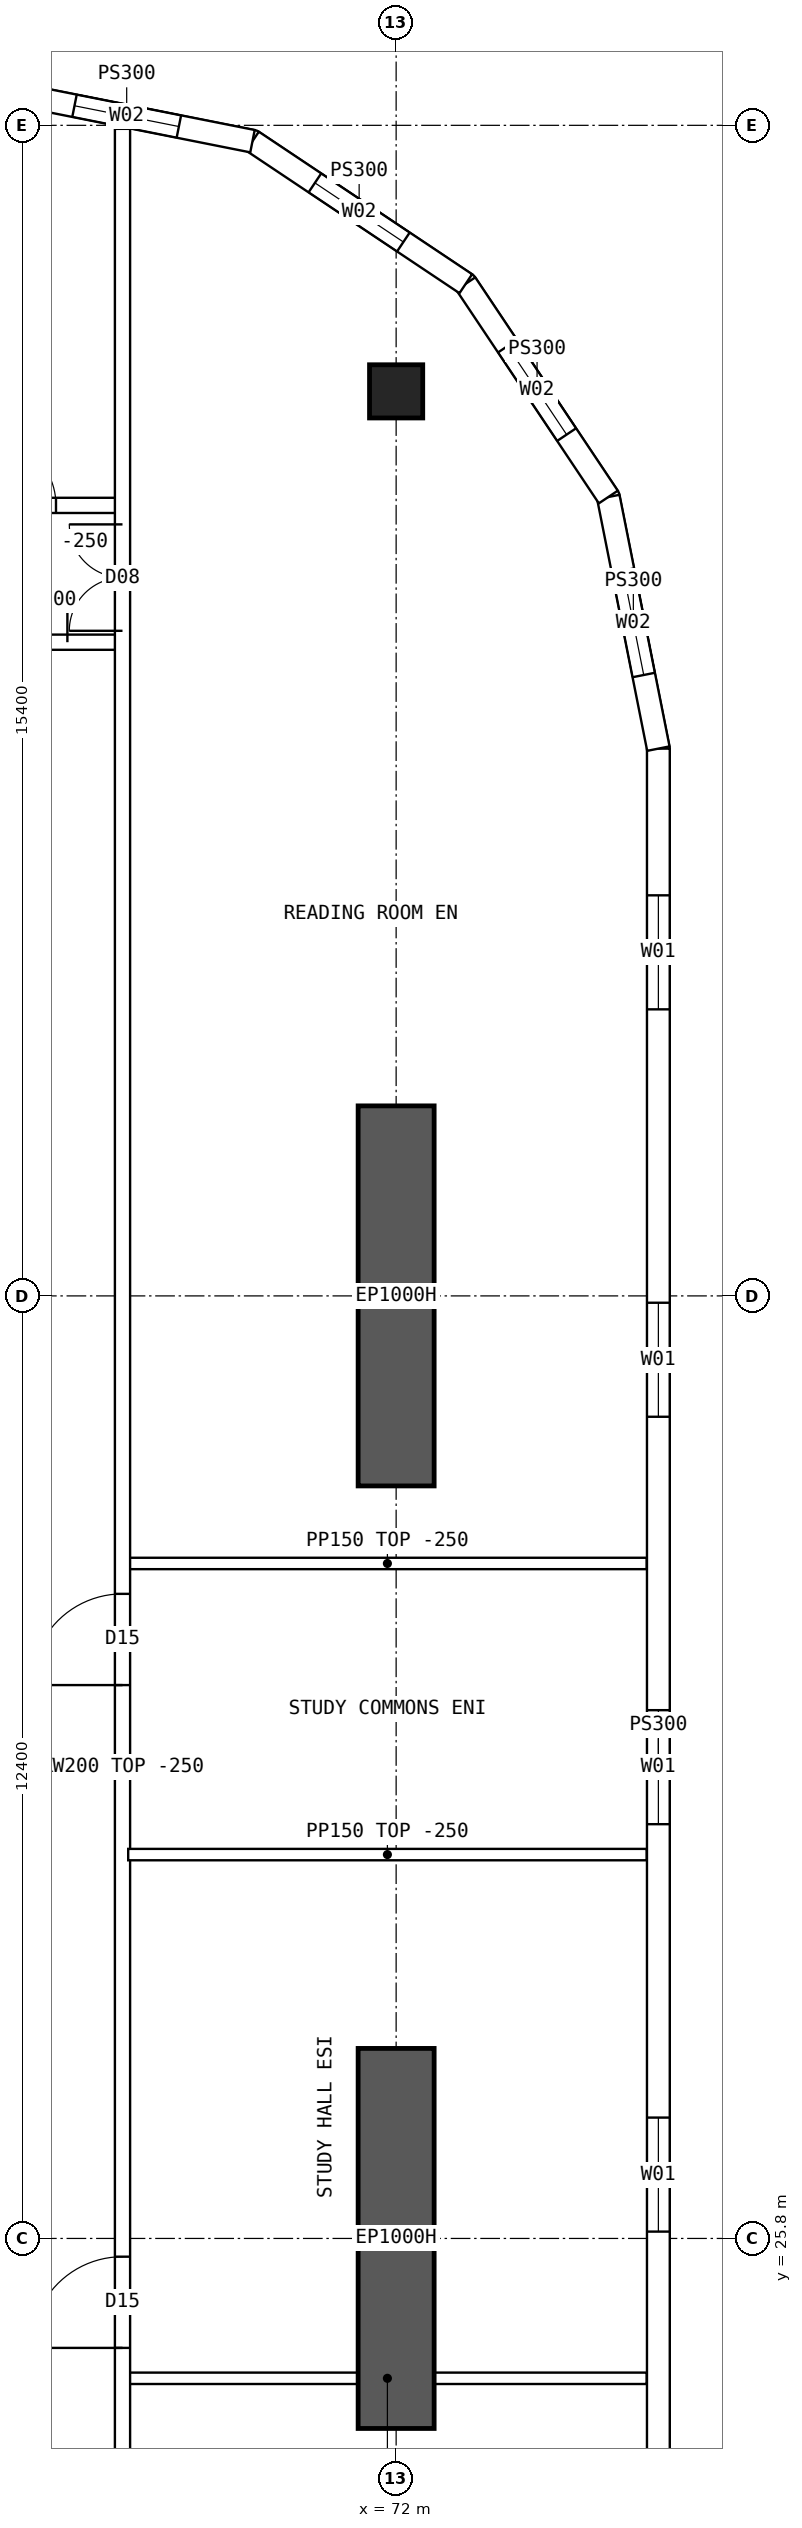
"""IFC4 building model, lengths in metres.
Left out: names, types, materials, properties, quantities, classifications, styles, units other than length and angle.
Written with IfcOpenShell. Run it as: python <this file> out.ifc"""

import sys

from ifc_helpers import new_model, si_unit, direction, frame, frame_2d, origin, origin_2d, place, context, subcontext, project, spatial, polyline, rectangle, hollow_rectangle, outline, extrude, element, fill, save


model = new_model("IFC4")
c1 = context("Model", 3, precision=1e-05, world=origin(), true_north=direction((0.0, 1.0)))
c2 = subcontext(c1, "Body", "Model", "MODEL_VIEW")
j1 = project(units=[si_unit("LENGTHUNIT", "METRE"), si_unit("PLANEANGLEUNIT", "RADIAN")], contexts=[c1])
p1 = place(None, origin())
s1 = spatial("IfcSite", under=j1, at=p1, CompositionType="ELEMENT")
p2 = place(p1, origin())
s2 = spatial("IfcBuilding", under=s1, at=p2, CompositionType="ELEMENT")
p3 = place(p2, frame((0.0, 0.0, 171.1)))
s3 = spatial("IfcBuildingStorey", under=s2, at=p3, CompositionType="ELEMENT", Elevation=171.1)
p4 = place(p3, frame((72.0, 50.1, 0.0), z_axis=(0.0, 0.0, 1.0), x_axis=(1.0, 0.0, 0.0)))
e1 = element("IfcColumn", 1, at=p4, inside=s3, PredefinedType="COLUMN", context=c2, shape_type="SweptSolid", body=[
    extrude(hollow_rectangle(XDim=0.7, YDim=0.7, WallThickness=0.07, at=origin_2d()), origin(), (0.0, 0.0, 1.0), 3.75),
])
for number, where, z_axis, x_axis in (
    (2, (72.0, 23.3, 0.0), (0.0, 0.0, 1.0), (0.0, 1.0, 0.0)),
    (3, (72.0, 35.7, 0.0), (0.0, 0.0, 1.0), (0.0, 1.0, 0.0)),
):
    element("IfcWall", number, at=place(p3, frame(where, z_axis=z_axis, x_axis=x_axis)), inside=s3, PredefinedType="SHEAR", context=c2, shape_type="SweptSolid", body=[
        extrude(rectangle(XDim=5.0, YDim=1.0, at=frame_2d((2.5, 0.0))), origin(), (0.0, 0.0, 1.0), 3.75),
    ])
p5 = place(p3, frame((75.45, 18.6, 0.0), z_axis=(0.0, 0.0, 1.0), x_axis=(0.0, 1.0, 0.0)))
e4 = element("IfcWall", 4, at=p5, inside=s3, PredefinedType="SOLIDWALL", context=c2, shape_type="SweptSolid", body=[
    extrude(outline(polyline([(-0.015, -0.15), (26.815, -0.15), (26.785, 0.15), (0.015, 0.15), (-0.015, -0.15)])), origin(), (0.0, 0.0, 1.0), 3.5),
])
p6 = place(p5, frame((1.93, 0.0, 0.9)))
e5 = element("IfcOpeningElement", 5, at=p6, cuts=e4, PredefinedType="OPENING", context=c2, shape_type="SweptSolid", body=[
    extrude(rectangle(XDim=1.5, YDim=2.0, at=frame_2d((0.75, 1.0))), frame((0.0, 0.16, 0.0), z_axis=(0.0, -1.0, 0.0), x_axis=(1.0, 0.0, 0.0)), (0.0, 0.0, 1.0), 0.32),
])
p7 = place(p5, frame((7.29, 0.0, 0.9)))
e6 = element("IfcOpeningElement", 6, at=p7, cuts=e4, PredefinedType="OPENING", context=c2, shape_type="SweptSolid", body=[
    extrude(rectangle(XDim=1.5, YDim=2.0, at=frame_2d((0.75, 1.0))), frame((0.0, 0.16, 0.0), z_axis=(0.0, -1.0, 0.0), x_axis=(1.0, 0.0, 0.0)), (0.0, 0.0, 1.0), 0.32),
])
p8 = place(p5, frame((12.65, 0.0, 0.9)))
e7 = element("IfcOpeningElement", 7, at=p8, cuts=e4, PredefinedType="OPENING", context=c2, shape_type="SweptSolid", body=[
    extrude(rectangle(XDim=1.5, YDim=2.0, at=frame_2d((0.75, 1.0))), frame((0.0, 0.16, 0.0), z_axis=(0.0, -1.0, 0.0), x_axis=(1.0, 0.0, 0.0)), (0.0, 0.0, 1.0), 0.32),
])
p9 = place(p5, frame((18.01, 0.0, 0.9)))
e8 = element("IfcOpeningElement", 8, at=p9, cuts=e4, PredefinedType="OPENING", context=c2, shape_type="SweptSolid", body=[
    extrude(rectangle(XDim=1.5, YDim=2.0, at=frame_2d((0.75, 1.0))), frame((0.0, 0.16, 0.0), z_axis=(0.0, -1.0, 0.0), x_axis=(1.0, 0.0, 0.0)), (0.0, 0.0, 1.0), 0.32),
])
p10 = place(p5, frame((23.37, 0.0, 0.9)))
e9 = element("IfcOpeningElement", 9, at=p10, cuts=e4, PredefinedType="OPENING", context=c2, shape_type="SweptSolid", body=[
    extrude(rectangle(XDim=1.5, YDim=2.0, at=frame_2d((0.75, 1.0))), frame((0.0, 0.16, 0.0), z_axis=(0.0, -1.0, 0.0), x_axis=(1.0, 0.0, 0.0)), (0.0, 0.0, 1.0), 0.32),
])
p11 = place(p3, frame((75.45, 45.4, 0.0), z_axis=(0.0, 0.0, 1.0), x_axis=(-0.19508664885, 0.980786011034, 0.0)))
e10 = element("IfcWall", 10, at=p11, inside=s3, PredefinedType="SOLIDWALL", context=c2, shape_type="SweptSolid", body=[
    extrude(outline(polyline([(-0.015, -0.15), (3.405, -0.15), (3.345, 0.15), (0.015, 0.15), (-0.015, -0.15)])), origin(), (0.0, 0.0, 1.0), 3.5),
])
p12 = place(p11, frame((0.988, 0.0, 0.9)))
e11 = element("IfcOpeningElement", 11, at=p12, cuts=e10, PredefinedType="OPENING", context=c2, shape_type="SweptSolid", body=[
    extrude(rectangle(XDim=1.4, YDim=1.8, at=frame_2d((0.7, 0.9))), frame((0.0, 0.16, 0.0), z_axis=(0.0, -1.0, 0.0), x_axis=(1.0, 0.0, 0.0)), (0.0, 0.0, 1.0), 0.32),
])
p13 = place(p3, frame((74.792, 48.71, 0.0), z_axis=(0.0, 0.0, 1.0), x_axis=(-0.555534554399, 0.831493450887, 0.0)))
e12 = element("IfcWall", 12, at=p13, inside=s3, PredefinedType="SOLIDWALL", context=c2, shape_type="SweptSolid", body=[
    extrude(outline(polyline([(-0.03, -0.15), (3.405, -0.15), (3.345, 0.15), (0.03, 0.15), (-0.03, -0.15)])), origin(), (0.0, 0.0, 1.0), 3.5),
])
p14 = place(p13, frame((0.988, 0.0, 0.9)))
e13 = element("IfcOpeningElement", 13, at=p14, cuts=e12, PredefinedType="OPENING", context=c2, shape_type="SweptSolid", body=[
    extrude(rectangle(XDim=1.4, YDim=1.8, at=frame_2d((0.7, 0.9))), frame((0.0, 0.16, 0.0), z_axis=(0.0, -1.0, 0.0), x_axis=(1.0, 0.0, 0.0)), (0.0, 0.0, 1.0), 0.32),
])
p15 = place(p3, frame((72.917, 51.517, 0.0), z_axis=(0.0, 0.0, 1.0), x_axis=(-0.831493450887, 0.555534554399, 0.0)))
e14 = element("IfcWall", 14, at=p15, inside=s3, PredefinedType="SOLIDWALL", context=c2, shape_type="SweptSolid", body=[
    extrude(outline(polyline([(-0.03, -0.15), (3.405, -0.15), (3.345, 0.15), (0.03, 0.15), (-0.03, -0.15)])), origin(), (0.0, 0.0, 1.0), 3.5),
])
p16 = place(p15, frame((0.988, 0.0, 0.9)))
e15 = element("IfcOpeningElement", 15, at=p16, cuts=e14, PredefinedType="OPENING", context=c2, shape_type="SweptSolid", body=[
    extrude(rectangle(XDim=1.4, YDim=1.8, at=frame_2d((0.7, 0.9))), frame((0.0, 0.16, 0.0), z_axis=(0.0, -1.0, 0.0), x_axis=(1.0, 0.0, 0.0)), (0.0, 0.0, 1.0), 0.32),
])
p17 = place(p3, frame((70.11, 53.392, 0.0), z_axis=(0.0, 0.0, 1.0), x_axis=(-0.98078325777, 0.195100490205, 0.0)))
e16 = element("IfcWall", 16, at=p17, inside=s3, PredefinedType="SOLIDWALL", context=c2, shape_type="SweptSolid", body=[
    extrude(outline(polyline([(-0.03, -0.15), (3.405, -0.15), (3.345, 0.15), (0.03, 0.15), (-0.03, -0.15)])), origin(), (0.0, 0.0, 1.0), 3.5),
])
p18 = place(p17, frame((0.988, 0.0, 0.9)))
e17 = element("IfcOpeningElement", 17, at=p18, cuts=e16, PredefinedType="OPENING", context=c2, shape_type="SweptSolid", body=[
    extrude(rectangle(XDim=1.4, YDim=1.8, at=frame_2d((0.7, 0.9))), frame((0.0, 0.16, 0.0), z_axis=(0.0, -1.0, 0.0), x_axis=(1.0, 0.0, 0.0)), (0.0, 0.0, 1.0), 0.32),
])
p19 = place(p3, frame((66.425, 48.6, 0.0), z_axis=(0.0, 0.0, 1.0), x_axis=(1.0, 0.0, 0.0)))
e18 = element("IfcWall", 18, at=p19, inside=s3, PredefinedType="SOLIDWALL", context=c2, shape_type="SweptSolid", body=[
    extrude(rectangle(XDim=1.975, YDim=0.2, at=frame_2d((0.987, 0.0))), origin(), (0.0, 0.0, 1.0), 3.5),
])
p20 = place(p19, frame((0.2, 0.0, 0.0)))
e19 = element("IfcOpeningElement", 19, at=p20, cuts=e18, PredefinedType="OPENING", context=c2, shape_type="SweptSolid", body=[
    extrude(rectangle(XDim=0.9, YDim=2.1, at=frame_2d((0.45, 1.05))), frame((0.0, 0.11, 0.0), z_axis=(0.0, -1.0, 0.0), x_axis=(1.0, 0.0, 0.0)), (0.0, 0.0, 1.0), 0.22),
])
p21 = place(p3, frame((66.425, 46.8, 0.0), z_axis=(0.0, 0.0, 1.0), x_axis=(1.0, 0.0, 0.0)))
e20 = element("IfcWall", 20, at=p21, inside=s3, PredefinedType="SOLIDWALL", context=c2, shape_type="SweptSolid", body=[
    extrude(rectangle(XDim=1.975, YDim=0.2, at=frame_2d((0.987, 0.0))), origin(), (0.0, 0.0, 1.0), 3.5),
])
p22 = place(p21, frame((0.05, 0.0, 0.0)))
e21 = element("IfcOpeningElement", 21, at=p22, cuts=e20, PredefinedType="OPENING", context=c2, shape_type="SweptSolid", body=[
    extrude(rectangle(XDim=1.2, YDim=2.1, at=frame_2d((0.6, 1.05))), frame((0.0, 0.11, 0.0), z_axis=(0.0, -1.0, 0.0), x_axis=(1.0, 0.0, 0.0)), (0.0, 0.0, 1.0), 0.22),
])
p23 = place(p3, frame((68.475, 30.85, 0.0), z_axis=(0.0, 0.0, 1.0), x_axis=(1.0, 0.0, 0.0)))
e22 = element("IfcWall", 22, at=p23, inside=s3, PredefinedType="PARTITIONING", context=c2, shape_type="SweptSolid", body=[
    extrude(outline(polyline([(0.0, 0.0), (6.82, 0.0), (6.82, 3.5), (3.827, 3.5), (3.825, 3.05), (3.227, 3.05), (3.225, 3.5), (0.0, 3.5), (0.0, 0.0)])), frame((0.0, 0.075, 0.0), z_axis=(0.0, -1.0, 0.0), x_axis=(1.0, 0.0, 0.0)), (0.0, 0.0, 1.0), 0.15),
])
p24 = place(p3, frame((68.4, 10.446, 0.0), z_axis=(0.0, 0.0, 1.0), x_axis=(0.0, 1.0, 0.0)))
e23 = element("IfcWall", 23, at=p24, inside=s3, PredefinedType="SOLIDWALL", context=c2, shape_type="SweptSolid", body=[
    extrude(rectangle(XDim=43.107, YDim=0.2, at=frame_2d((21.554, 0.0))), origin(), (0.0, 0.0, 1.0), 3.5),
])
p25 = place(p24, frame((13.914, 0.0, 0.0)))
e24 = element("IfcOpeningElement", 24, at=p25, cuts=e23, PredefinedType="OPENING", context=c2, shape_type="SweptSolid", body=[
    extrude(rectangle(XDim=1.2, YDim=2.1, at=frame_2d((0.6, 1.05))), frame((0.0, 0.11, 0.0), z_axis=(0.0, -1.0, 0.0), x_axis=(1.0, 0.0, 0.0)), (0.0, 0.0, 1.0), 0.22),
])
p26 = place(p24, frame((22.634, 0.0, 0.0)))
e25 = element("IfcOpeningElement", 25, at=p26, cuts=e23, PredefinedType="OPENING", context=c2, shape_type="SweptSolid", body=[
    extrude(rectangle(XDim=1.2, YDim=2.1, at=frame_2d((0.6, 1.05))), frame((0.0, 0.11, 0.0), z_axis=(0.0, -1.0, 0.0), x_axis=(1.0, 0.0, 0.0)), (0.0, 0.0, 1.0), 0.22),
])
p27 = place(p24, frame((5.104, 0.0, 0.0)))
e26 = element("IfcOpeningElement", 26, at=p27, cuts=e23, PredefinedType="OPENING", context=c2, shape_type="SweptSolid", body=[
    extrude(rectangle(XDim=1.4, YDim=2.1, at=frame_2d((0.7, 1.05))), frame((0.0, 0.11, 0.0), z_axis=(0.0, -1.0, 0.0), x_axis=(1.0, 0.0, 0.0)), (0.0, 0.0, 1.0), 0.22),
])
p28 = place(p24, frame((36.504, 0.0, 0.0)))
e27 = element("IfcOpeningElement", 27, at=p28, cuts=e23, PredefinedType="OPENING", context=c2, shape_type="SweptSolid", body=[
    extrude(rectangle(XDim=1.4, YDim=2.1, at=frame_2d((0.7, 1.05))), frame((0.0, 0.11, 0.0), z_axis=(0.0, -1.0, 0.0), x_axis=(1.0, 0.0, 0.0)), (0.0, 0.0, 1.0), 0.22),
])
p29 = place(p3, frame((68.475, 23.96, 0.0), z_axis=(0.0, 0.0, 1.0), x_axis=(1.0, 0.0, 0.0)))
e28 = element("IfcWall", 28, at=p29, inside=s3, PredefinedType="PARTITIONING", context=c2, shape_type="SweptSolid", body=[
    extrude(rectangle(XDim=6.82, YDim=0.15, at=frame_2d((3.41, 0.0))), origin(), (0.0, 0.0, 1.0), 3.5),
])
p30 = place(p3, frame((68.475, 34.68, 0.0), z_axis=(0.0, 0.0, 1.0), x_axis=(1.0, 0.0, 0.0)))
e29 = element("IfcWall", 29, at=p30, inside=s3, PredefinedType="PARTITIONING", context=c2, shape_type="SweptSolid", body=[
    extrude(outline(polyline([(0.0, 0.0), (6.82, 0.0), (6.82, 3.5), (3.827, 3.5), (3.825, 3.05), (3.227, 3.05), (3.225, 3.5), (0.0, 3.5), (0.0, 0.0)])), frame((0.0, 0.075, 0.0), z_axis=(0.0, -1.0, 0.0), x_axis=(1.0, 0.0, 0.0)), (0.0, 0.0, 1.0), 0.15),
])
p31 = place(p7, origin())
e30 = element("IfcWindow", 30, at=p31, inside=s3, PartitioningType="SINGLE_PANEL", PredefinedType="WINDOW", context=c2, shape_type="SweptSolid", body=[
    extrude(rectangle(XDim=1.5, YDim=2.0, at=frame_2d((0.75, 1.0))), frame((0.0, 0.03, 0.0), z_axis=(0.0, -1.0, 0.0), x_axis=(1.0, 0.0, 0.0)), (0.0, 0.0, 1.0), 0.06),
])
fill(e6, e30)
p32 = place(p8, origin())
e31 = element("IfcWindow", 31, at=p32, inside=s3, PartitioningType="SINGLE_PANEL", PredefinedType="WINDOW", context=c2, shape_type="SweptSolid", body=[
    extrude(rectangle(XDim=1.5, YDim=2.0, at=frame_2d((0.75, 1.0))), frame((0.0, 0.03, 0.0), z_axis=(0.0, -1.0, 0.0), x_axis=(1.0, 0.0, 0.0)), (0.0, 0.0, 1.0), 0.06),
])
fill(e7, e31)
p33 = place(p9, origin())
e32 = element("IfcWindow", 32, at=p33, inside=s3, PartitioningType="SINGLE_PANEL", PredefinedType="WINDOW", context=c2, shape_type="SweptSolid", body=[
    extrude(rectangle(XDim=1.5, YDim=2.0, at=frame_2d((0.75, 1.0))), frame((0.0, 0.03, 0.0), z_axis=(0.0, -1.0, 0.0), x_axis=(1.0, 0.0, 0.0)), (0.0, 0.0, 1.0), 0.06),
])
fill(e8, e32)
p34 = place(p10, origin())
e33 = element("IfcWindow", 33, at=p34, inside=s3, PartitioningType="SINGLE_PANEL", PredefinedType="WINDOW", context=c2, shape_type="SweptSolid", body=[
    extrude(rectangle(XDim=1.5, YDim=2.0, at=frame_2d((0.75, 1.0))), frame((0.0, 0.03, 0.0), z_axis=(0.0, -1.0, 0.0), x_axis=(1.0, 0.0, 0.0)), (0.0, 0.0, 1.0), 0.06),
])
fill(e9, e33)
p35 = place(p12, origin())
e34 = element("IfcWindow", 34, at=p35, inside=s3, PartitioningType="SINGLE_PANEL", PredefinedType="WINDOW", context=c2, shape_type="SweptSolid", body=[
    extrude(rectangle(XDim=1.4, YDim=1.8, at=frame_2d((0.7, 0.9))), frame((0.0, 0.03, 0.0), z_axis=(0.0, -1.0, 0.0), x_axis=(1.0, 0.0, 0.0)), (0.0, 0.0, 1.0), 0.06),
])
fill(e11, e34)
p36 = place(p14, origin())
e35 = element("IfcWindow", 35, at=p36, inside=s3, PartitioningType="SINGLE_PANEL", PredefinedType="WINDOW", context=c2, shape_type="SweptSolid", body=[
    extrude(rectangle(XDim=1.4, YDim=1.8, at=frame_2d((0.7, 0.9))), frame((0.0, 0.03, 0.0), z_axis=(0.0, -1.0, 0.0), x_axis=(1.0, 0.0, 0.0)), (0.0, 0.0, 1.0), 0.06),
])
fill(e13, e35)
p37 = place(p16, origin())
e36 = element("IfcWindow", 36, at=p37, inside=s3, PartitioningType="SINGLE_PANEL", PredefinedType="WINDOW", context=c2, shape_type="SweptSolid", body=[
    extrude(rectangle(XDim=1.4, YDim=1.8, at=frame_2d((0.7, 0.9))), frame((0.0, 0.03, 0.0), z_axis=(0.0, -1.0, 0.0), x_axis=(1.0, 0.0, 0.0)), (0.0, 0.0, 1.0), 0.06),
])
fill(e15, e36)
p38 = place(p18, origin())
e37 = element("IfcWindow", 37, at=p38, inside=s3, PartitioningType="SINGLE_PANEL", PredefinedType="WINDOW", context=c2, shape_type="SweptSolid", body=[
    extrude(rectangle(XDim=1.4, YDim=1.8, at=frame_2d((0.7, 0.9))), frame((0.0, 0.03, 0.0), z_axis=(0.0, -1.0, 0.0), x_axis=(1.0, 0.0, 0.0)), (0.0, 0.0, 1.0), 0.06),
])
fill(e17, e37)
p39 = place(p22, origin())
e38 = element("IfcDoor", 38, at=p39, inside=s3, OperationType="DOUBLE_DOOR_SINGLE_SWING", PredefinedType="DOOR", context=c2, shape_type="SweptSolid", body=[
    extrude(rectangle(XDim=1.2, YDim=2.1, at=frame_2d((0.6, 1.05))), frame((0.0, 0.025, 0.0), z_axis=(0.0, -1.0, 0.0), x_axis=(1.0, 0.0, 0.0)), (0.0, 0.0, 1.0), 0.05),
])
fill(e21, e38)
p40 = place(p25, origin())
e39 = element("IfcDoor", 39, at=p40, inside=s3, OperationType="SINGLE_SWING_LEFT", PredefinedType="DOOR", context=c2, shape_type="SweptSolid", body=[
    extrude(rectangle(XDim=1.2, YDim=2.1, at=frame_2d((0.6, 1.05))), frame((0.0, 0.025, 0.0), z_axis=(0.0, -1.0, 0.0), x_axis=(1.0, 0.0, 0.0)), (0.0, 0.0, 1.0), 0.05),
])
fill(e24, e39)
p41 = place(p26, origin())
e40 = element("IfcDoor", 40, at=p41, inside=s3, OperationType="SINGLE_SWING_LEFT", PredefinedType="DOOR", context=c2, shape_type="SweptSolid", body=[
    extrude(rectangle(XDim=1.2, YDim=2.1, at=frame_2d((0.6, 1.05))), frame((0.0, 0.025, 0.0), z_axis=(0.0, -1.0, 0.0), x_axis=(1.0, 0.0, 0.0)), (0.0, 0.0, 1.0), 0.05),
])
fill(e25, e40)
p42 = place(p28, origin())
e41 = element("IfcDoor", 41, at=p42, inside=s3, OperationType="DOUBLE_DOOR_SINGLE_SWING", PredefinedType="DOOR", context=c2, shape_type="SweptSolid", body=[
    extrude(rectangle(XDim=1.4, YDim=2.1, at=frame_2d((0.7, 1.05))), frame((0.0, 0.025, 0.0), z_axis=(0.0, -1.0, 0.0), x_axis=(1.0, 0.0, 0.0)), (0.0, 0.0, 1.0), 0.05),
])
fill(e27, e41)
p43 = place(p20, origin())
e42 = element("IfcDoor", 42, at=p43, inside=s3, OperationType="SINGLE_SWING_LEFT", PredefinedType="DOOR", context=c2, shape_type="SweptSolid", body=[
    extrude(rectangle(XDim=0.9, YDim=2.1, at=frame_2d((0.45, 1.05))), frame((0.0, 0.025, 0.0), z_axis=(0.0, -1.0, 0.0), x_axis=(1.0, 0.0, 0.0)), (0.0, 0.0, 1.0), 0.05),
])
fill(e19, e42)
save(model, sys.argv[1])
